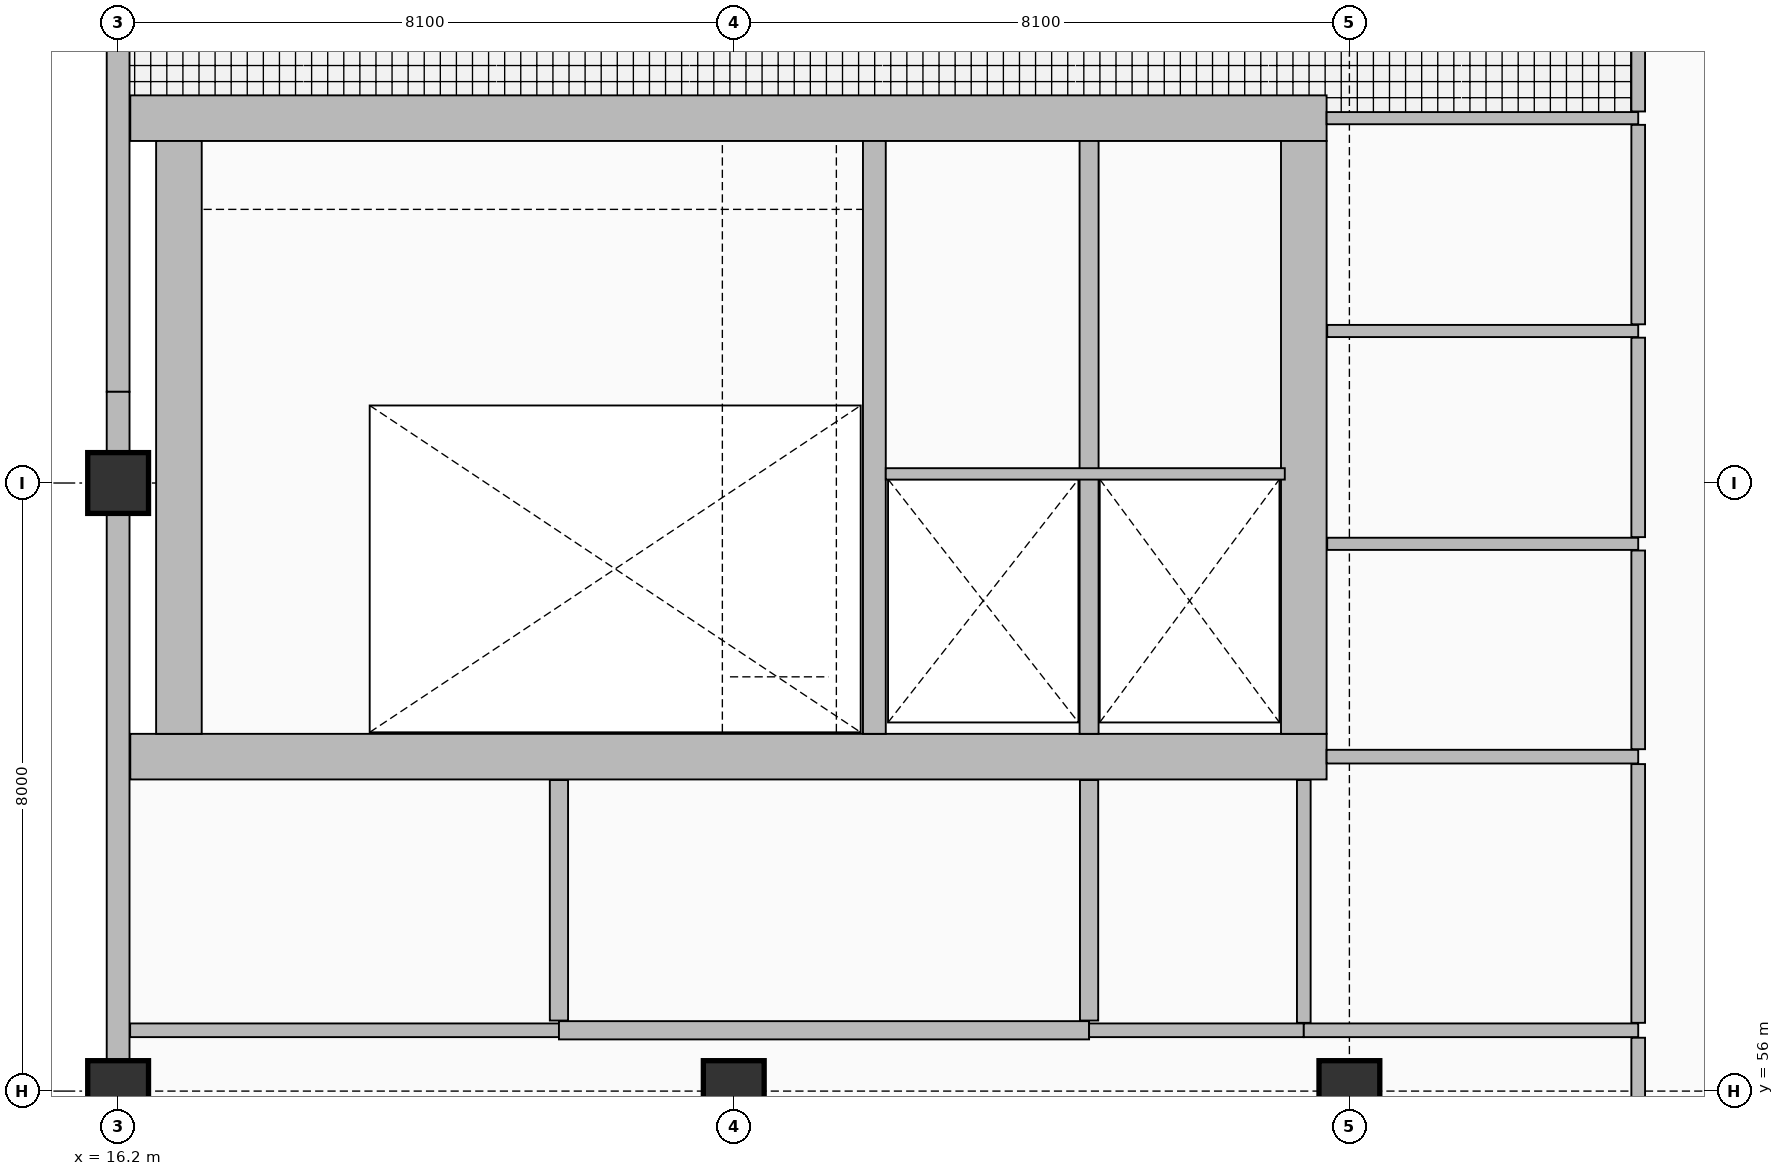
"""IFC4 building model, lengths in metres.
Left out: names, types, materials, properties, quantities, classifications, styles, units other than length and angle.
Written with IfcOpenShell. Run it as: python <this file> out.ifc"""

import sys

from ifc_helpers import new_model, si_unit, direction, frame, frame_2d, origin, origin_2d, place, context, subcontext, project, spatial, rectangle, extrude, element, fill, save


model = new_model("IFC4")
c1 = context("Model", 3, precision=1e-05, world=origin(), true_north=direction((0.0, 1.0)))
c2 = subcontext(c1, "Body", "Model", "MODEL_VIEW")
j1 = project(units=[si_unit("LENGTHUNIT", "METRE"), si_unit("PLANEANGLEUNIT", "RADIAN")], contexts=[c1])
p1 = place(None, origin())
s1 = spatial("IfcSite", under=j1, at=p1, CompositionType="ELEMENT")
p2 = place(p1, origin())
s2 = spatial("IfcBuilding", under=s1, at=p2, CompositionType="ELEMENT")
p3 = place(p2, origin())
s3 = spatial("IfcBuildingStorey", under=s2, at=p3, CompositionType="ELEMENT", Elevation=0.0)
p4 = place(p3, frame((16.36, 60.4, 0.0), z_axis=(0.0, 0.0, 1.0), x_axis=(1.0, 0.0, 0.0)))
e1 = element("IfcWall", 1, at=p4, inside=s3, PredefinedType="SHEAR", context=c2, shape_type="SweptSolid", body=[
    extrude(rectangle(XDim=15.74, YDim=0.6, at=frame_2d((7.87, 0.0))), origin(), (0.0, 0.0, 1.0), 5.4),
])
p5 = place(p4, frame((1.39, 0.0, 0.0)))
e2 = element("IfcOpeningElement", 2, at=p5, cuts=e1, PredefinedType="OPENING", context=c2, shape_type="SweptSolid", body=[
    extrude(rectangle(XDim=1.15, YDim=2.25, at=frame_2d((0.575, 1.125))), frame((0.0, 0.31, 0.0), z_axis=(0.0, -1.0, 0.0), x_axis=(1.0, 0.0, 0.0)), (0.0, 0.0, 1.0), 0.62),
])
p6 = place(p4, frame((10.673, 0.0, 0.0)))
e3 = element("IfcOpeningElement", 3, at=p6, cuts=e1, PredefinedType="OPENING", context=c2, shape_type="SweptSolid", body=[
    extrude(rectangle(XDim=1.1, YDim=2.2, at=frame_2d((0.55, 1.1))), frame((0.0, 0.31, 0.0), z_axis=(0.0, -1.0, 0.0), x_axis=(1.0, 0.0, 0.0)), (0.0, 0.0, 1.0), 0.62),
])
p7 = place(p4, frame((13.387, 0.0, 0.0)))
e4 = element("IfcOpeningElement", 4, at=p7, cuts=e1, PredefinedType="OPENING", context=c2, shape_type="SweptSolid", body=[
    extrude(rectangle(XDim=1.1, YDim=2.2, at=frame_2d((0.55, 1.1))), frame((0.0, 0.31, 0.0), z_axis=(0.0, -1.0, 0.0), x_axis=(1.0, 0.0, 0.0)), (0.0, 0.0, 1.0), 0.62),
])
p8 = place(p3, frame((16.36, 68.8, 0.0), z_axis=(0.0, 0.0, 1.0), x_axis=(1.0, 0.0, 0.0)))
e5 = element("IfcWall", 5, at=p8, inside=s3, PredefinedType="SHEAR", context=c2, shape_type="SweptSolid", body=[
    extrude(rectangle(XDim=15.74, YDim=0.6, at=frame_2d((7.87, 0.0))), origin(), (0.0, 0.0, 1.0), 5.4),
])
for number, where, z_axis, x_axis in (
    (6, (17.0, 60.7, 0.0), (0.0, 0.0, 1.0), (0.0, 1.0, 0.0)),
    (7, (31.8, 60.7, 0.0), (0.0, 0.0, 1.0), (0.0, 1.0, 0.0)),
):
    element("IfcWall", number, at=place(p3, frame(where, z_axis=z_axis, x_axis=x_axis)), inside=s3, PredefinedType="SHEAR", context=c2, shape_type="SweptSolid", body=[
        extrude(rectangle(XDim=7.8, YDim=0.6, at=frame_2d((3.9, 0.0))), origin(), (0.0, 0.0, 1.0), 5.4),
    ])
p9 = place(p3, frame((26.15, 60.7, 0.0), z_axis=(0.0, 0.0, 1.0), x_axis=(0.0, 1.0, 0.0)))
e8 = element("IfcWall", 8, at=p9, inside=s3, PredefinedType="SHEAR", context=c2, shape_type="SweptSolid", body=[
    extrude(rectangle(XDim=7.8, YDim=0.3, at=frame_2d((3.9, 0.0))), origin(), (0.0, 0.0, 1.0), 5.4),
])
p10 = place(p3, frame((28.975, 60.7, 0.0), z_axis=(0.0, 0.0, 1.0), x_axis=(0.0, 1.0, 0.0)))
e9 = element("IfcWall", 9, at=p10, inside=s3, PredefinedType="SHEAR", context=c2, shape_type="SweptSolid", body=[
    extrude(rectangle(XDim=7.8, YDim=0.25, at=frame_2d((3.9, 0.0))), origin(), (0.0, 0.0, 1.0), 5.4),
])
for number, where, z_axis, x_axis in (
    (10, (16.2, 56.0, 0.0), (0.0, 0.0, 1.0), (1.0, 0.0, 0.0)),
    (11, (16.2, 64.0, 0.0), (0.0, 0.0, 1.0), (1.0, 0.0, 0.0)),
    (12, (24.3, 56.0, 0.0), (0.0, 0.0, 1.0), (1.0, 0.0, 0.0)),
    (13, (32.4, 56.0, 0.0), (0.0, 0.0, 1.0), (1.0, 0.0, 0.0)),
):
    element("IfcColumn", number, at=place(p3, frame(where, z_axis=z_axis, x_axis=x_axis)), inside=s3, PredefinedType="COLUMN", context=c2, shape_type="SweptSolid", body=[
        extrude(rectangle(XDim=0.8, YDim=0.8, at=origin_2d()), origin(), (0.0, 0.0, 1.0), 5.4),
    ])
p11 = place(p3, frame((16.2, 80.8, 0.0), z_axis=(0.0, 0.0, 1.0), x_axis=(0.0, -1.0, 0.0)))
e14 = element("IfcWall", 14, at=p11, inside=s3, PredefinedType="SOLIDWALL", context=c2, shape_type="SweptSolid", body=[
    extrude(rectangle(XDim=15.6, YDim=0.3, at=frame_2d((7.8, 0.0))), origin(), (0.0, 0.0, 1.0), 4.512),
])
p12 = place(p11, frame((4.36, 0.0, 0.0)))
e15 = element("IfcOpeningElement", 15, at=p12, cuts=e14, PredefinedType="OPENING", context=c2, shape_type="SweptSolid", body=[
    extrude(rectangle(XDim=2.2, YDim=2.6, at=frame_2d((1.1, 1.3))), frame((0.0, 0.16, 0.0), z_axis=(0.0, -1.0, 0.0), x_axis=(1.0, 0.0, 0.0)), (0.0, 0.0, 1.0), 0.32),
])
p13 = place(p3, frame((16.2, 65.2, 0.0), z_axis=(0.0, 0.0, 1.0), x_axis=(0.0, -1.0, 0.0)))
e16 = element("IfcWall", 16, at=p13, inside=s3, PredefinedType="SOLIDWALL", context=c2, shape_type="SweptSolid", body=[
    extrude(rectangle(XDim=15.6, YDim=0.3, at=frame_2d((7.8, 0.0))), origin(), (0.0, 0.0, 1.0), 4.512),
])
p14 = place(p13, frame((5.8, 0.0, 0.0)))
e17 = element("IfcOpeningElement", 17, at=p14, cuts=e16, PredefinedType="OPENING", context=c2, shape_type="SweptSolid", body=[
    extrude(rectangle(XDim=1.8, YDim=2.4, at=frame_2d((0.9, 1.2))), frame((0.0, 0.16, 0.0), z_axis=(0.0, -1.0, 0.0), x_axis=(1.0, 0.0, 0.0)), (0.0, 0.0, 1.0), 0.32),
])
p15 = place(p3, frame((26.3, 64.12, 0.0), z_axis=(0.0, 0.0, 1.0), x_axis=(1.0, 0.0, 0.0)))
e18 = element("IfcWall", 18, at=p15, inside=s3, PredefinedType="PARTITIONING", context=c2, shape_type="SweptSolid", body=[
    extrude(rectangle(XDim=5.25, YDim=0.15, at=frame_2d((2.625, 0.0))), origin(), (0.0, 0.0, 1.0), 5.12),
])
p16 = place(p3, frame((16.358, 56.8, 0.0), z_axis=(0.0, 0.0, 1.0), x_axis=(1.0, 0.0, 0.0)))
e19 = element("IfcWall", 19, at=p16, inside=s3, PredefinedType="PARTITIONING", context=c2, shape_type="SweptSolid", body=[
    extrude(rectangle(XDim=5.642, YDim=0.18, at=frame_2d((2.821, 0.0))), origin(), (0.0, 0.0, 1.0), 5.12),
])
p17 = place(p16, frame((2.271, 0.0, 0.0)))
e20 = element("IfcOpeningElement", 20, at=p17, cuts=e19, PredefinedType="OPENING", context=c2, shape_type="SweptSolid", body=[
    extrude(rectangle(XDim=1.1, YDim=2.2, at=frame_2d((0.55, 1.1))), frame((0.0, 0.1, 0.0), z_axis=(0.0, -1.0, 0.0), x_axis=(1.0, 0.0, 0.0)), (0.0, 0.0, 1.0), 0.2),
])
p18 = place(p3, frame((22.0, 56.8, 0.0), z_axis=(0.0, 0.0, 1.0), x_axis=(1.0, 0.0, 0.0)))
e21 = element("IfcWall", 21, at=p18, inside=s3, PredefinedType="PARTITIONING", context=c2, shape_type="SweptSolid", body=[
    extrude(rectangle(XDim=6.975, YDim=0.24, at=frame_2d((3.488, 0.0))), origin(), (0.0, 0.0, 1.0), 5.12),
])
p19 = place(p18, frame((4.003, 0.0, 0.0)))
e22 = element("IfcOpeningElement", 22, at=p19, cuts=e21, PredefinedType="OPENING", context=c2, shape_type="SweptSolid", body=[
    extrude(rectangle(XDim=1.2, YDim=2.3, at=frame_2d((0.6, 1.15))), frame((0.0, 0.13, 0.0), z_axis=(0.0, -1.0, 0.0), x_axis=(1.0, 0.0, 0.0)), (0.0, 0.0, 1.0), 0.26),
])
p20 = place(p3, frame((28.975, 56.8, 0.0), z_axis=(0.0, 0.0, 1.0), x_axis=(1.0, 0.0, 0.0)))
e23 = element("IfcWall", 23, at=p20, inside=s3, PredefinedType="PARTITIONING", context=c2, shape_type="SweptSolid", body=[
    extrude(rectangle(XDim=2.825, YDim=0.18, at=frame_2d((1.413, 0.0))), origin(), (0.0, 0.0, 1.0), 5.12),
])
p21 = place(p20, frame((0.636, 0.0, 0.0)))
e24 = element("IfcOpeningElement", 24, at=p21, cuts=e23, PredefinedType="OPENING", context=c2, shape_type="SweptSolid", body=[
    extrude(rectangle(XDim=1.1, YDim=2.2, at=frame_2d((0.55, 1.1))), frame((0.0, 0.1, 0.0), z_axis=(0.0, -1.0, 0.0), x_axis=(1.0, 0.0, 0.0)), (0.0, 0.0, 1.0), 0.2),
])
p22 = place(p3, frame((31.8, 56.8, 0.0), z_axis=(0.0, 0.0, 1.0), x_axis=(1.0, 0.0, 0.0)))
e25 = element("IfcWall", 25, at=p22, inside=s3, PredefinedType="PARTITIONING", context=c2, shape_type="SweptSolid", body=[
    extrude(rectangle(XDim=4.4, YDim=0.18, at=frame_2d((2.2, 0.0))), origin(), (0.0, 0.0, 1.0), 5.12),
])
p23 = place(p3, frame((32.1, 60.4, 0.0), z_axis=(0.0, 0.0, 1.0), x_axis=(1.0, 0.0, 0.0)))
e26 = element("IfcWall", 26, at=p23, inside=s3, PredefinedType="PARTITIONING", context=c2, shape_type="SweptSolid", body=[
    extrude(rectangle(XDim=4.1, YDim=0.18, at=frame_2d((2.05, 0.0))), origin(), (0.0, 0.0, 1.0), 5.12),
])
for number, where, z_axis, x_axis in (
    (27, (32.108, 63.2, 0.0), (0.0, 0.0, 1.0), (1.0, 0.0, 0.0)),
    (28, (32.108, 66.0, 0.0), (0.0, 0.0, 1.0), (1.0, 0.0, 0.0)),
):
    element("IfcWall", number, at=place(p3, frame(where, z_axis=z_axis, x_axis=x_axis)), inside=s3, PredefinedType="PARTITIONING", context=c2, shape_type="SweptSolid", body=[
        extrude(rectangle(XDim=4.092, YDim=0.16, at=frame_2d((2.046, 0.0))), origin(), (0.0, 0.0, 1.0), 5.12),
    ])
p24 = place(p3, frame((32.1, 68.8, 0.0), z_axis=(0.0, 0.0, 1.0), x_axis=(1.0, 0.0, 0.0)))
e29 = element("IfcWall", 29, at=p24, inside=s3, PredefinedType="PARTITIONING", context=c2, shape_type="SweptSolid", body=[
    extrude(rectangle(XDim=4.1, YDim=0.16, at=frame_2d((2.05, 0.0))), origin(), (0.0, 0.0, 1.0), 5.12),
])
p25 = place(p3, frame((22.0, 56.928, 0.0), z_axis=(0.0, 0.0, 1.0), x_axis=(0.0, 1.0, 0.0)))
e30 = element("IfcWall", 30, at=p25, inside=s3, PredefinedType="PARTITIONING", context=c2, shape_type="SweptSolid", body=[
    extrude(rectangle(XDim=3.164, YDim=0.24, at=frame_2d((1.582, 0.0))), origin(), (0.0, 0.0, 1.0), 5.12),
])
p26 = place(p25, frame((1.082, 0.0, 0.0)))
e31 = element("IfcOpeningElement", 31, at=p26, cuts=e30, PredefinedType="OPENING", context=c2, shape_type="SweptSolid", body=[
    extrude(rectangle(XDim=1.0, YDim=2.2, at=frame_2d((0.5, 1.1))), frame((0.0, 0.13, 0.0), z_axis=(0.0, -1.0, 0.0), x_axis=(1.0, 0.0, 0.0)), (0.0, 0.0, 1.0), 0.26),
])
p27 = place(p3, frame((28.975, 56.928, 0.0), z_axis=(0.0, 0.0, 1.0), x_axis=(0.0, 1.0, 0.0)))
e32 = element("IfcWall", 32, at=p27, inside=s3, PredefinedType="PARTITIONING", context=c2, shape_type="SweptSolid", body=[
    extrude(rectangle(XDim=3.164, YDim=0.24, at=frame_2d((1.582, 0.0))), origin(), (0.0, 0.0, 1.0), 5.12),
])
p28 = place(p3, frame((31.8, 56.898, 0.0), z_axis=(0.0, 0.0, 1.0), x_axis=(0.0, 1.0, 0.0)))
e33 = element("IfcWall", 33, at=p28, inside=s3, PredefinedType="PARTITIONING", context=c2, shape_type="SweptSolid", body=[
    extrude(rectangle(XDim=3.194, YDim=0.18, at=frame_2d((1.597, 0.0))), origin(), (0.0, 0.0, 1.0), 5.12),
])
p29 = place(p3, frame((36.2, 53.298, 0.0), z_axis=(0.0, 0.0, 1.0), x_axis=(0.0, 1.0, 0.0)))
e34 = element("IfcWall", 34, at=p29, inside=s3, PredefinedType="PARTITIONING", context=c2, shape_type="SweptSolid", body=[
    extrude(rectangle(XDim=3.404, YDim=0.18, at=frame_2d((1.702, 0.0))), origin(), (0.0, 0.0, 1.0), 4.705),
])
p30 = place(p29, frame((1.152, 0.0, 0.0)))
e35 = element("IfcOpeningElement", 35, at=p30, cuts=e34, PredefinedType="OPENING", context=c2, shape_type="SweptSolid", body=[
    extrude(rectangle(XDim=1.1, YDim=2.2, at=frame_2d((0.55, 1.1))), frame((0.0, 0.1, 0.0), z_axis=(0.0, -1.0, 0.0), x_axis=(1.0, 0.0, 0.0)), (0.0, 0.0, 1.0), 0.2),
])
p31 = place(p3, frame((36.2, 56.898, 0.0), z_axis=(0.0, 0.0, 1.0), x_axis=(0.0, 1.0, 0.0)))
e36 = element("IfcWall", 36, at=p31, inside=s3, PredefinedType="PARTITIONING", context=c2, shape_type="SweptSolid", body=[
    extrude(rectangle(XDim=3.404, YDim=0.18, at=frame_2d((1.702, 0.0))), origin(), (0.0, 0.0, 1.0), 5.12),
])
p32 = place(p31, frame((1.202, 0.0, 0.0)))
e37 = element("IfcOpeningElement", 37, at=p32, cuts=e36, PredefinedType="OPENING", context=c2, shape_type="SweptSolid", body=[
    extrude(rectangle(XDim=1.0, YDim=2.15, at=frame_2d((0.5, 1.075))), frame((0.0, 0.1, 0.0), z_axis=(0.0, -1.0, 0.0), x_axis=(1.0, 0.0, 0.0)), (0.0, 0.0, 1.0), 0.2),
])
p33 = place(p3, frame((36.2, 60.498, 0.0), z_axis=(0.0, 0.0, 1.0), x_axis=(0.0, 1.0, 0.0)))
e38 = element("IfcWall", 38, at=p33, inside=s3, PredefinedType="PARTITIONING", context=c2, shape_type="SweptSolid", body=[
    extrude(rectangle(XDim=2.614, YDim=0.18, at=frame_2d((1.307, 0.0))), origin(), (0.0, 0.0, 1.0), 5.12),
])
p34 = place(p33, frame((0.832, 0.0, 0.0)))
e39 = element("IfcOpeningElement", 39, at=p34, cuts=e38, PredefinedType="OPENING", context=c2, shape_type="SweptSolid", body=[
    extrude(rectangle(XDim=0.95, YDim=2.1, at=frame_2d((0.475, 1.05))), frame((0.0, 0.1, 0.0), z_axis=(0.0, -1.0, 0.0), x_axis=(1.0, 0.0, 0.0)), (0.0, 0.0, 1.0), 0.2),
])
p35 = place(p3, frame((36.2, 63.288, 0.0), z_axis=(0.0, 0.0, 1.0), x_axis=(0.0, 1.0, 0.0)))
e40 = element("IfcWall", 40, at=p35, inside=s3, PredefinedType="PARTITIONING", context=c2, shape_type="SweptSolid", body=[
    extrude(rectangle(XDim=2.624, YDim=0.18, at=frame_2d((1.312, 0.0))), origin(), (0.0, 0.0, 1.0), 5.12),
])
p36 = place(p35, frame((0.837, 0.0, 0.0)))
e41 = element("IfcOpeningElement", 41, at=p36, cuts=e40, PredefinedType="OPENING", context=c2, shape_type="SweptSolid", body=[
    extrude(rectangle(XDim=0.95, YDim=2.1, at=frame_2d((0.475, 1.05))), frame((0.0, 0.1, 0.0), z_axis=(0.0, -1.0, 0.0), x_axis=(1.0, 0.0, 0.0)), (0.0, 0.0, 1.0), 0.2),
])
p37 = place(p3, frame((36.2, 66.088, 0.0), z_axis=(0.0, 0.0, 1.0), x_axis=(0.0, 1.0, 0.0)))
e42 = element("IfcWall", 42, at=p37, inside=s3, PredefinedType="PARTITIONING", context=c2, shape_type="SweptSolid", body=[
    extrude(rectangle(XDim=2.624, YDim=0.18, at=frame_2d((1.312, 0.0))), origin(), (0.0, 0.0, 1.0), 5.12),
])
p38 = place(p37, frame((0.812, 0.0, 0.0)))
e43 = element("IfcOpeningElement", 43, at=p38, cuts=e42, PredefinedType="OPENING", context=c2, shape_type="SweptSolid", body=[
    extrude(rectangle(XDim=1.0, YDim=2.15, at=frame_2d((0.5, 1.075))), frame((0.0, 0.1, 0.0), z_axis=(0.0, -1.0, 0.0), x_axis=(1.0, 0.0, 0.0)), (0.0, 0.0, 1.0), 0.2),
])
p39 = place(p3, frame((36.2, 68.888, 0.0), z_axis=(0.0, 0.0, 1.0), x_axis=(0.0, 1.0, 0.0)))
e44 = element("IfcWall", 44, at=p39, inside=s3, PredefinedType="PARTITIONING", context=c2, shape_type="SweptSolid", body=[
    extrude(rectangle(XDim=14.044, YDim=0.18, at=frame_2d((7.022, 0.0))), origin(), (0.0, 0.0, 1.0), 4.705),
])
p40 = place(p39, frame((6.472, 0.0, 0.0)))
e45 = element("IfcOpeningElement", 45, at=p40, cuts=e44, PredefinedType="OPENING", context=c2, shape_type="SweptSolid", body=[
    extrude(rectangle(XDim=1.1, YDim=2.2, at=frame_2d((0.55, 1.1))), frame((0.0, 0.1, 0.0), z_axis=(0.0, -1.0, 0.0), x_axis=(1.0, 0.0, 0.0)), (0.0, 0.0, 1.0), 0.2),
])
p41 = place(p14, frame((1.8, 0.0, 0.0), z_axis=(0.0, 0.0, 1.0), x_axis=(-1.0, 0.0, 0.0)))
e46 = element("IfcDoor", 46, at=p41, inside=s3, OperationType="DOUBLE_DOOR_SINGLE_SWING", PredefinedType="DOOR", context=c2, shape_type="SweptSolid", body=[
    extrude(rectangle(XDim=1.8, YDim=2.4, at=frame_2d((0.9, 1.2))), frame((0.0, 0.025, 0.0), z_axis=(0.0, -1.0, 0.0), x_axis=(1.0, 0.0, 0.0)), (0.0, 0.0, 1.0), 0.05),
])
fill(e17, e46)
p42 = place(p5, frame((1.15, 0.0, 0.0), z_axis=(0.0, 0.0, 1.0), x_axis=(-1.0, 0.0, 0.0)))
e47 = element("IfcDoor", 47, at=p42, inside=s3, OperationType="SINGLE_SWING_RIGHT", PredefinedType="DOOR", context=c2, shape_type="SweptSolid", body=[
    extrude(rectangle(XDim=1.15, YDim=2.25, at=frame_2d((0.575, 1.125))), frame((0.0, 0.025, 0.0), z_axis=(0.0, -1.0, 0.0), x_axis=(1.0, 0.0, 0.0)), (0.0, 0.0, 1.0), 0.05),
])
fill(e2, e47)
p43 = place(p6, frame((1.1, 0.0, 0.0), z_axis=(0.0, 0.0, 1.0), x_axis=(-1.0, 0.0, 0.0)))
e48 = element("IfcDoor", 48, at=p43, inside=s3, OperationType="DOUBLE_DOOR_SLIDING", PredefinedType="DOOR", context=c2, shape_type="SweptSolid", body=[
    extrude(rectangle(XDim=1.1, YDim=2.2, at=frame_2d((0.55, 1.1))), frame((0.0, 0.025, 0.0), z_axis=(0.0, -1.0, 0.0), x_axis=(1.0, 0.0, 0.0)), (0.0, 0.0, 1.0), 0.05),
])
fill(e3, e48)
p44 = place(p7, frame((1.1, 0.0, 0.0), z_axis=(0.0, 0.0, 1.0), x_axis=(-1.0, 0.0, 0.0)))
e49 = element("IfcDoor", 49, at=p44, inside=s3, OperationType="DOUBLE_DOOR_SLIDING", PredefinedType="DOOR", context=c2, shape_type="SweptSolid", body=[
    extrude(rectangle(XDim=1.1, YDim=2.2, at=frame_2d((0.55, 1.1))), frame((0.0, 0.025, 0.0), z_axis=(0.0, -1.0, 0.0), x_axis=(1.0, 0.0, 0.0)), (0.0, 0.0, 1.0), 0.05),
])
fill(e4, e49)
p45 = place(p17, frame((1.1, 0.0, 0.0), z_axis=(0.0, 0.0, 1.0), x_axis=(-1.0, 0.0, 0.0)))
e50 = element("IfcDoor", 50, at=p45, inside=s3, OperationType="SINGLE_SWING_LEFT", PredefinedType="DOOR", context=c2, shape_type="SweptSolid", body=[
    extrude(rectangle(XDim=1.1, YDim=2.2, at=frame_2d((0.55, 1.1))), frame((0.0, 0.025, 0.0), z_axis=(0.0, -1.0, 0.0), x_axis=(1.0, 0.0, 0.0)), (0.0, 0.0, 1.0), 0.05),
])
fill(e20, e50)
p46 = place(p19, frame((1.2, 0.0, 0.0), z_axis=(0.0, 0.0, 1.0), x_axis=(-1.0, 0.0, 0.0)))
e51 = element("IfcDoor", 51, at=p46, inside=s3, OperationType="SINGLE_SWING_RIGHT", PredefinedType="DOOR", context=c2, shape_type="SweptSolid", body=[
    extrude(rectangle(XDim=1.2, YDim=2.3, at=frame_2d((0.6, 1.15))), frame((0.0, 0.025, 0.0), z_axis=(0.0, -1.0, 0.0), x_axis=(1.0, 0.0, 0.0)), (0.0, 0.0, 1.0), 0.05),
])
fill(e22, e51)
p47 = place(p21, frame((1.1, 0.0, 0.0), z_axis=(0.0, 0.0, 1.0), x_axis=(-1.0, 0.0, 0.0)))
e52 = element("IfcDoor", 52, at=p47, inside=s3, OperationType="SINGLE_SWING_RIGHT", PredefinedType="DOOR", context=c2, shape_type="SweptSolid", body=[
    extrude(rectangle(XDim=1.1, YDim=2.2, at=frame_2d((0.55, 1.1))), frame((0.0, 0.025, 0.0), z_axis=(0.0, -1.0, 0.0), x_axis=(1.0, 0.0, 0.0)), (0.0, 0.0, 1.0), 0.05),
])
fill(e24, e52)
p48 = place(p26, origin())
e53 = element("IfcDoor", 53, at=p48, inside=s3, OperationType="SINGLE_SWING_RIGHT", PredefinedType="DOOR", context=c2, shape_type="SweptSolid", body=[
    extrude(rectangle(XDim=1.0, YDim=2.2, at=frame_2d((0.5, 1.1))), frame((0.0, 0.025, 0.0), z_axis=(0.0, -1.0, 0.0), x_axis=(1.0, 0.0, 0.0)), (0.0, 0.0, 1.0), 0.05),
])
fill(e31, e53)
p49 = place(p32, origin())
e54 = element("IfcDoor", 54, at=p49, inside=s3, OperationType="SINGLE_SWING_RIGHT", PredefinedType="DOOR", context=c2, shape_type="SweptSolid", body=[
    extrude(rectangle(XDim=1.0, YDim=2.15, at=frame_2d((0.5, 1.075))), frame((0.0, 0.025, 0.0), z_axis=(0.0, -1.0, 0.0), x_axis=(1.0, 0.0, 0.0)), (0.0, 0.0, 1.0), 0.05),
])
fill(e37, e54)
p50 = place(p34, origin())
e55 = element("IfcDoor", 55, at=p50, inside=s3, OperationType="SINGLE_SWING_LEFT", PredefinedType="DOOR", context=c2, shape_type="SweptSolid", body=[
    extrude(rectangle(XDim=0.95, YDim=2.1, at=frame_2d((0.475, 1.05))), frame((0.0, 0.025, 0.0), z_axis=(0.0, -1.0, 0.0), x_axis=(1.0, 0.0, 0.0)), (0.0, 0.0, 1.0), 0.05),
])
fill(e39, e55)
p51 = place(p36, origin())
e56 = element("IfcDoor", 56, at=p51, inside=s3, OperationType="SINGLE_SWING_RIGHT", PredefinedType="DOOR", context=c2, shape_type="SweptSolid", body=[
    extrude(rectangle(XDim=0.95, YDim=2.1, at=frame_2d((0.475, 1.05))), frame((0.0, 0.025, 0.0), z_axis=(0.0, -1.0, 0.0), x_axis=(1.0, 0.0, 0.0)), (0.0, 0.0, 1.0), 0.05),
])
fill(e41, e56)
p52 = place(p38, origin())
e57 = element("IfcDoor", 57, at=p52, inside=s3, OperationType="SINGLE_SWING_LEFT", PredefinedType="DOOR", context=c2, shape_type="SweptSolid", body=[
    extrude(rectangle(XDim=1.0, YDim=2.15, at=frame_2d((0.5, 1.075))), frame((0.0, 0.025, 0.0), z_axis=(0.0, -1.0, 0.0), x_axis=(1.0, 0.0, 0.0)), (0.0, 0.0, 1.0), 0.05),
])
fill(e43, e57)
save(model, sys.argv[1])
